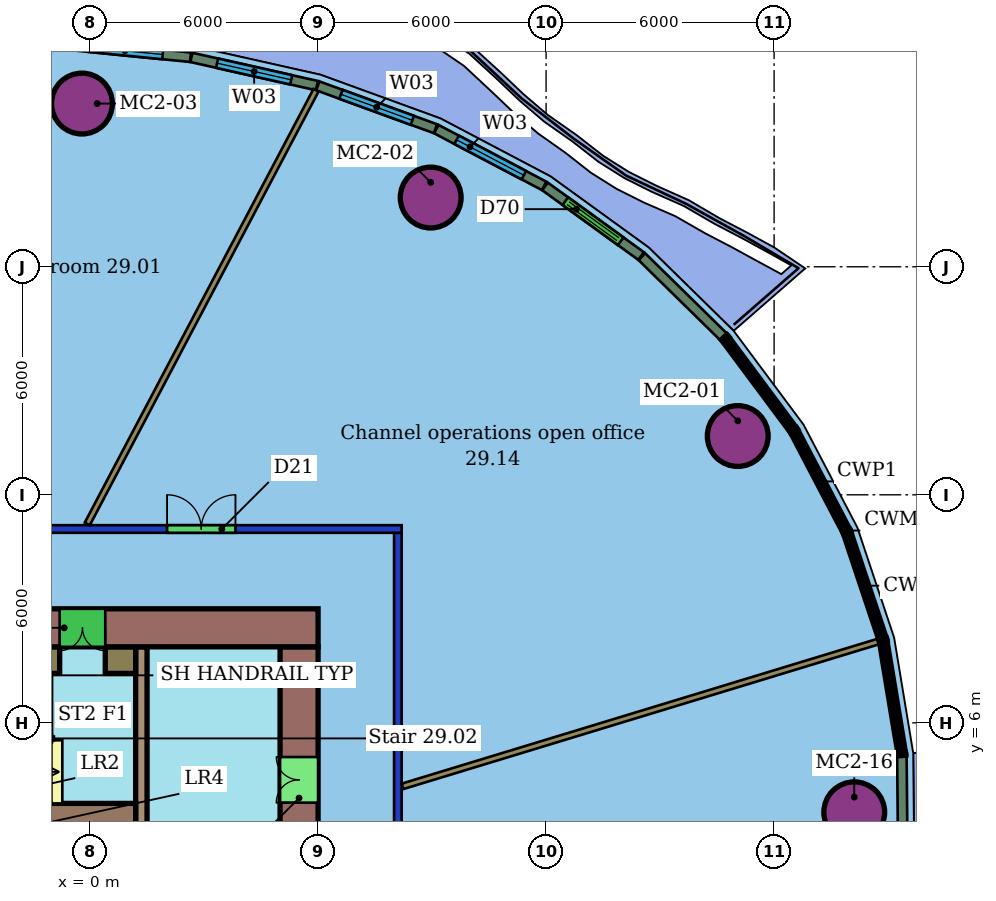
"""IFC4 building model, lengths in metres.
Left out: names, types, materials, properties, quantities, classifications, styles, units other than length and angle.
Written with IfcOpenShell. Run it as: python <this file> out.ifc"""

import sys

from ifc_helpers import new_model, si_unit, direction, frame, frame_2d, origin, origin_2d, place, context, subcontext, project, spatial, rectangle, hollow_circle, extrude, element, fill, save


model = new_model("IFC4")
c1 = context("Model", 3, precision=1e-05, world=origin(), true_north=direction((0.0, 1.0)))
c2 = subcontext(c1, "Body", "Model", "MODEL_VIEW")
j1 = project(units=[si_unit("LENGTHUNIT", "METRE"), si_unit("PLANEANGLEUNIT", "RADIAN")], contexts=[c1])
p1 = place(None, origin())
s1 = spatial("IfcSite", under=j1, at=p1, CompositionType="ELEMENT")
p2 = place(p1, origin())
s2 = spatial("IfcBuilding", under=s1, at=p2, CompositionType="ELEMENT")
p3 = place(p2, frame((0.0, 0.0, 124.6)))
s3 = spatial("IfcBuildingStorey", under=s2, at=p3, CompositionType="ELEMENT", Elevation=124.6)
for number, where, z_axis, x_axis in (
    (1, (17.043, 13.547, 0.0), (0.0, 0.0, 1.0), (1.0, 0.0, 0.0)),
    (2, (8.963, 19.821, 0.0), (0.0, 0.0, 1.0), (1.0, 0.0, 0.0)),
    (3, (-0.213, 22.294, 0.0), (0.0, 0.0, 1.0), (1.0, 0.0, 0.0)),
    (4, (20.109, 3.646, 0.0), (0.0, 0.0, 1.0), (1.0, 0.0, 0.0)),
):
    element("IfcColumn", number, at=place(p3, frame(where, z_axis=z_axis, x_axis=x_axis)), inside=s3, PredefinedType="COLUMN", context=c2, shape_type="SweptSolid", body=[
        extrude(hollow_circle(Radius=0.8, WallThickness=0.055, at=origin_2d()), origin(), (0.0, 0.0, 1.0), 3.45),
    ])
p4 = place(p3, frame((-20.2, 11.1, 0.0), z_axis=(0.0, 0.0, 1.0), x_axis=(1.0, 0.0, 0.0)))
e5 = element("IfcWall", 5, at=p4, inside=s3, PredefinedType="PARTITIONING", context=c2, shape_type="SweptSolid", body=[
    extrude(rectangle(XDim=28.4, YDim=0.2, at=frame_2d((14.2, 0.0))), origin(), (0.0, 0.0, 1.0), 3.0),
])
p5 = place(p4, frame((17.346, 0.0, 0.0)))
e6 = element("IfcOpeningElement", 6, at=p5, cuts=e5, PredefinedType="OPENING", context=c2, shape_type="SweptSolid", body=[
    extrude(rectangle(XDim=1.5, YDim=2.1, at=frame_2d((0.75, 1.05))), frame((0.0, 0.11, 0.0), z_axis=(0.0, -1.0, 0.0), x_axis=(1.0, 0.0, 0.0)), (0.0, 0.0, 1.0), 0.22),
])
p6 = place(p4, frame((10.966, 0.0, 0.0)))
e7 = element("IfcOpeningElement", 7, at=p6, cuts=e5, PredefinedType="OPENING", context=c2, shape_type="SweptSolid", body=[
    extrude(rectangle(XDim=1.0, YDim=2.1, at=frame_2d((0.5, 1.05))), frame((0.0, 0.11, 0.0), z_axis=(0.0, -1.0, 0.0), x_axis=(1.0, 0.0, 0.0)), (0.0, 0.0, 1.0), 0.22),
])
p7 = place(p4, frame((5.806, 0.0, 0.0)))
e8 = element("IfcOpeningElement", 8, at=p7, cuts=e5, PredefinedType="OPENING", context=c2, shape_type="SweptSolid", body=[
    extrude(rectangle(XDim=0.9, YDim=2.1, at=frame_2d((0.45, 1.05))), frame((0.0, 0.11, 0.0), z_axis=(0.0, -1.0, 0.0), x_axis=(1.0, 0.0, 0.0)), (0.0, 0.0, 1.0), 0.22),
])
p8 = place(p4, frame((22.226, 0.0, 0.0)))
e9 = element("IfcOpeningElement", 9, at=p8, cuts=e5, PredefinedType="OPENING", context=c2, shape_type="SweptSolid", body=[
    extrude(rectangle(XDim=1.8, YDim=2.1, at=frame_2d((0.9, 1.05))), frame((0.0, 0.11, 0.0), z_axis=(0.0, -1.0, 0.0), x_axis=(1.0, 0.0, 0.0)), (0.0, 0.0, 1.0), 0.22),
])
p9 = place(p3, frame((8.1, 11.0, 0.0), z_axis=(0.0, 0.0, 1.0), x_axis=(0.0, -1.0, 0.0)))
e10 = element("IfcWall", 10, at=p9, inside=s3, PredefinedType="PARTITIONING", context=c2, shape_type="SweptSolid", body=[
    extrude(rectangle(XDim=22.0, YDim=0.2, at=frame_2d((11.0, 0.0))), origin(), (0.0, 0.0, 1.0), 3.0),
])
p10 = place(p9, frame((18.584, 0.0, 0.0)))
e11 = element("IfcOpeningElement", 11, at=p10, cuts=e10, PredefinedType="OPENING", context=c2, shape_type="SweptSolid", body=[
    extrude(rectangle(XDim=1.0, YDim=2.1, at=frame_2d((0.5, 1.05))), frame((0.0, 0.11, 0.0), z_axis=(0.0, -1.0, 0.0), x_axis=(1.0, 0.0, 0.0)), (0.0, 0.0, 1.0), 0.22),
])
p11 = place(p9, frame((14.647, 0.0, 0.0)))
e12 = element("IfcOpeningElement", 12, at=p11, cuts=e10, PredefinedType="OPENING", context=c2, shape_type="SweptSolid", body=[
    extrude(rectangle(XDim=1.0, YDim=2.4, at=frame_2d((0.5, 1.2))), frame((0.0, 0.11, 0.0), z_axis=(0.0, -1.0, 0.0), x_axis=(1.0, 0.0, 0.0)), (0.0, 0.0, 1.0), 0.22),
])
p12 = place(p9, frame((8.033, 0.0, 0.0)))
e13 = element("IfcOpeningElement", 13, at=p12, cuts=e10, PredefinedType="OPENING", context=c2, shape_type="SweptSolid", body=[
    extrude(rectangle(XDim=0.9, YDim=2.1, at=frame_2d((0.45, 1.05))), frame((0.0, 0.11, 0.0), z_axis=(0.0, -1.0, 0.0), x_axis=(1.0, 0.0, 0.0)), (0.0, 0.0, 1.0), 0.22),
])
p13 = place(p3, frame((5.946, 22.644, 0.0), z_axis=(0.0, 0.0, 1.0), x_axis=(-0.466623744036, -0.884455924002, 0.0)))
e14 = element("IfcWall", 14, at=p13, inside=s3, PredefinedType="PARTITIONING", context=c2, shape_type="SweptSolid", body=[
    extrude(rectangle(XDim=12.9, YDim=0.15, at=frame_2d((6.45, 0.0))), origin(), (0.0, 0.0, 1.0), 3.45),
])
p14 = place(p3, frame((20.746, 8.14, 0.0), z_axis=(0.0, 0.0, 1.0), x_axis=(-0.956669363106, -0.291176458003, 0.0)))
e15 = element("IfcWall", 15, at=p14, inside=s3, PredefinedType="PARTITIONING", context=c2, shape_type="SweptSolid", body=[
    extrude(rectangle(XDim=13.091, YDim=0.15, at=frame_2d((6.545, 0.0))), origin(), (0.0, 0.0, 1.0), 3.45),
])
p15 = place(p3, frame((16.671, 16.155, 0.0), z_axis=(0.0, 0.0, 1.0), x_axis=(-0.713759845589, 0.700390521656, 0.0)))
e16 = element("IfcWall", 16, at=p15, inside=s3, PredefinedType="SOLIDWALL", context=c2, shape_type="SweptSolid", body=[
    extrude(rectangle(XDim=3.013, YDim=0.25, at=frame_2d((1.507, 0.0))), origin(), (0.0, 0.0, 1.0), 3.05),
])
p16 = place(p3, frame((14.5, 18.283, 0.0), z_axis=(0.0, 0.0, 1.0), x_axis=(-0.809860169176, 0.586622967828, 0.0)))
e17 = element("IfcWall", 17, at=p16, inside=s3, PredefinedType="SOLIDWALL", context=c2, shape_type="SweptSolid", body=[
    extrude(rectangle(XDim=3.124, YDim=0.25, at=frame_2d((1.562, 0.0))), origin(), (0.0, 0.0, 1.0), 3.05),
])
p17 = place(p16, frame((0.662, 0.0, 0.0)))
e18 = element("IfcOpeningElement", 18, at=p17, cuts=e17, PredefinedType="OPENING", context=c2, shape_type="SweptSolid", body=[
    extrude(rectangle(XDim=1.8, YDim=2.4, at=frame_2d((0.9, 1.2))), frame((0.0, 0.135, 0.0), z_axis=(0.0, -1.0, 0.0), x_axis=(1.0, 0.0, 0.0)), (0.0, 0.0, 1.0), 0.27),
])
p18 = place(p3, frame((11.948, 20.129, 0.0), z_axis=(0.0, 0.0, 1.0), x_axis=(-0.884863700739, 0.465850009245, 0.0)))
e19 = element("IfcWall", 19, at=p18, inside=s3, PredefinedType="SOLIDWALL", context=c2, shape_type="SweptSolid", body=[
    extrude(rectangle(XDim=3.206, YDim=0.25, at=frame_2d((1.603, 0.0))), origin(), (0.0, 0.0, 1.0), 3.05),
])
p19 = place(p18, frame((0.603, 0.0, 0.9)))
e20 = element("IfcOpeningElement", 20, at=p19, cuts=e19, PredefinedType="OPENING", context=c2, shape_type="SweptSolid", body=[
    extrude(rectangle(XDim=2.0, YDim=2.1, at=frame_2d((1.0, 1.05))), frame((0.0, 0.135, 0.0), z_axis=(0.0, -1.0, 0.0), x_axis=(1.0, 0.0, 0.0)), (0.0, 0.0, 1.0), 0.27),
])
p20 = place(p3, frame((9.089, 21.632, 0.0), z_axis=(0.0, 0.0, 1.0), x_axis=(-0.939579104827, 0.342331864969, 0.0)))
e21 = element("IfcWall", 21, at=p20, inside=s3, PredefinedType="SOLIDWALL", context=c2, shape_type="SweptSolid", body=[
    extrude(rectangle(XDim=3.296, YDim=0.25, at=frame_2d((1.648, 0.0))), origin(), (0.0, 0.0, 1.0), 3.05),
])
p21 = place(p20, frame((0.648, 0.0, 0.9)))
e22 = element("IfcOpeningElement", 22, at=p21, cuts=e21, PredefinedType="OPENING", context=c2, shape_type="SweptSolid", body=[
    extrude(rectangle(XDim=2.0, YDim=2.1, at=frame_2d((1.0, 1.05))), frame((0.0, 0.135, 0.0), z_axis=(0.0, -1.0, 0.0), x_axis=(1.0, 0.0, 0.0)), (0.0, 0.0, 1.0), 0.27),
])
p22 = place(p3, frame((5.969, 22.767, 0.0), z_axis=(0.0, 0.0, 1.0), x_axis=(-0.975690768568, 0.219151828949, 0.0)))
e23 = element("IfcWall", 23, at=p22, inside=s3, PredefinedType="SOLIDWALL", context=c2, shape_type="SweptSolid", body=[
    extrude(rectangle(XDim=3.385, YDim=0.25, at=frame_2d((1.693, 0.0))), origin(), (0.0, 0.0, 1.0), 3.05),
])
p23 = place(p22, frame((0.693, 0.0, 0.9)))
e24 = element("IfcOpeningElement", 24, at=p23, cuts=e23, PredefinedType="OPENING", context=c2, shape_type="SweptSolid", body=[
    extrude(rectangle(XDim=2.0, YDim=2.1, at=frame_2d((1.0, 1.05))), frame((0.0, 0.135, 0.0), z_axis=(0.0, -1.0, 0.0), x_axis=(1.0, 0.0, 0.0)), (0.0, 0.0, 1.0), 0.27),
])
p24 = place(p3, frame((2.643, 23.513, 0.0), z_axis=(0.0, 0.0, 1.0), x_axis=(-0.995116970578, 0.09870265887, 0.0)))
e25 = element("IfcWall", 25, at=p24, inside=s3, PredefinedType="SOLIDWALL", context=c2, shape_type="SweptSolid", body=[
    extrude(rectangle(XDim=3.47, YDim=0.25, at=frame_2d((1.735, 0.0))), origin(), (0.0, 0.0, 1.0), 3.05),
])
p25 = place(p24, frame((0.735, 0.0, 0.9)))
e26 = element("IfcOpeningElement", 26, at=p25, cuts=e25, PredefinedType="OPENING", context=c2, shape_type="SweptSolid", body=[
    extrude(rectangle(XDim=2.0, YDim=2.1, at=frame_2d((1.0, 1.05))), frame((0.0, 0.135, 0.0), z_axis=(0.0, -1.0, 0.0), x_axis=(1.0, 0.0, 0.0)), (0.0, 0.0, 1.0), 0.27),
])
p26 = place(p3, frame((21.391, 2.111, 0.0), z_axis=(0.0, 0.0, 1.0), x_axis=(-0.009399908842, 0.999955819881, 0.0)))
e27 = element("IfcWall", 27, at=p26, inside=s3, PredefinedType="SOLIDWALL", context=c2, shape_type="SweptSolid", body=[
    extrude(rectangle(XDim=3.013, YDim=0.25, at=frame_2d((1.506, 0.0))), origin(), (0.0, 0.0, 1.0), 3.05),
])
p27 = place(p3, frame((6.0, 8.5, 0.0), z_axis=(0.0, 0.0, 1.0), x_axis=(-1.0, 0.0, 0.0)))
e28 = element("IfcWall", 28, at=p27, inside=s3, PredefinedType="SHEAR", context=c2, shape_type="SweptSolid", body=[
    extrude(rectangle(XDim=12.0, YDim=1.0, at=frame_2d((6.0, 0.0))), origin(), (0.0, 0.0, 1.0), 3.3),
])
p28 = place(p27, frame((5.6, 0.0, 0.0)))
e29 = element("IfcOpeningElement", 29, at=p28, cuts=e28, PredefinedType="OPENING", context=c2, shape_type="SweptSolid", body=[
    extrude(rectangle(XDim=1.2, YDim=2.1, at=frame_2d((0.6, 1.05))), frame((0.0, 0.51, 0.0), z_axis=(0.0, -1.0, 0.0), x_axis=(1.0, 0.0, 0.0)), (0.0, 0.0, 1.0), 1.02),
])
p29 = place(p3, frame((5.5, -8.0, 0.0), z_axis=(0.0, 0.0, 1.0), x_axis=(0.0, 1.0, 0.0)))
e30 = element("IfcWall", 30, at=p29, inside=s3, PredefinedType="SHEAR", context=c2, shape_type="SweptSolid", body=[
    extrude(rectangle(XDim=16.0, YDim=1.0, at=frame_2d((8.0, 0.0))), origin(), (0.0, 0.0, 1.0), 3.3),
])
p30 = place(p29, frame((2.9, 0.0, 0.0)))
e31 = element("IfcOpeningElement", 31, at=p30, cuts=e30, PredefinedType="OPENING", context=c2, shape_type="SweptSolid", body=[
    extrude(rectangle(XDim=1.2, YDim=2.1, at=frame_2d((0.6, 1.05))), frame((0.0, 0.51, 0.0), z_axis=(0.0, -1.0, 0.0), x_axis=(1.0, 0.0, 0.0)), (0.0, 0.0, 1.0), 1.02),
])
p31 = place(p29, frame((11.9, 0.0, 0.0)))
e32 = element("IfcOpeningElement", 32, at=p31, cuts=e30, PredefinedType="OPENING", context=c2, shape_type="SweptSolid", body=[
    extrude(rectangle(XDim=1.2, YDim=2.1, at=frame_2d((0.6, 1.05))), frame((0.0, 0.51, 0.0), z_axis=(0.0, -1.0, 0.0), x_axis=(1.0, 0.0, 0.0)), (0.0, 0.0, 1.0), 1.02),
])
p32 = place(p3, frame((-6.0, 3.58, 0.0), z_axis=(0.0, 0.0, 1.0), x_axis=(1.0, 0.0, 0.0)))
e33 = element("IfcWall", 33, at=p32, inside=s3, PredefinedType="SHEAR", context=c2, shape_type="SweptSolid", body=[
    extrude(rectangle(XDim=7.2, YDim=0.6, at=frame_2d((3.6, 0.0))), origin(), (0.0, 0.0, 1.0), 3.3),
])
p33 = place(p3, frame((1.35, -8.0, 0.0), z_axis=(0.0, 0.0, 1.0), x_axis=(0.0, 1.0, 0.0)))
e34 = element("IfcWall", 34, at=p33, inside=s3, PredefinedType="SHEAR", context=c2, shape_type="SweptSolid", body=[
    extrude(rectangle(XDim=16.0, YDim=0.3, at=frame_2d((8.0, 0.0))), origin(), (0.0, 0.0, 1.0), 3.3),
])
p34 = place(p33, frame((1.91, 0.0, 0.0)))
e35 = element("IfcOpeningElement", 35, at=p34, cuts=e34, PredefinedType="OPENING", context=c2, shape_type="SweptSolid", body=[
    extrude(rectangle(XDim=1.0, YDim=2.1, at=frame_2d((0.5, 1.05))), frame((0.0, 0.16, 0.0), z_axis=(0.0, -1.0, 0.0), x_axis=(1.0, 0.0, 0.0)), (0.0, 0.0, 1.0), 0.32),
])
p35 = place(p33, frame((7.25, 0.0, 0.0)))
e36 = element("IfcOpeningElement", 36, at=p35, cuts=e34, PredefinedType="OPENING", context=c2, shape_type="SweptSolid", body=[
    extrude(rectangle(XDim=1.5, YDim=2.1, at=frame_2d((0.75, 1.05))), frame((0.0, 0.16, 0.0), z_axis=(0.0, -1.0, 0.0), x_axis=(1.0, 0.0, 0.0)), (0.0, 0.0, 1.0), 0.32),
])
p36 = place(p3, frame((-5.85, 7.65, 0.0), z_axis=(0.0, 0.0, 1.0), x_axis=(1.0, 0.0, 0.0)))
e37 = element("IfcWall", 37, at=p36, inside=s3, PredefinedType="SHEAR", context=c2, shape_type="SweptSolid", body=[
    extrude(rectangle(XDim=5.05, YDim=0.7, at=frame_2d((2.525, 0.0))), origin(), (0.0, 0.0, 1.0), 3.3),
])
p37 = place(p3, frame((0.4, 7.65, 0.0), z_axis=(0.0, 0.0, 1.0), x_axis=(1.0, 0.0, 0.0)))
e38 = element("IfcWall", 38, at=p37, inside=s3, PredefinedType="SHEAR", context=c2, shape_type="SweptSolid", body=[
    extrude(rectangle(XDim=0.8, YDim=0.7, at=frame_2d((0.4, 0.0))), origin(), (0.0, 0.0, 1.0), 3.3),
])
p38 = place(p8, origin())
e39 = element("IfcDoor", 39, at=p38, inside=s3, OperationType="DOUBLE_DOOR_SINGLE_SWING", PredefinedType="DOOR", context=c2, shape_type="SweptSolid", body=[
    extrude(rectangle(XDim=1.8, YDim=2.1, at=frame_2d((0.9, 1.05))), frame((0.0, 0.025, 0.0), z_axis=(0.0, -1.0, 0.0), x_axis=(1.0, 0.0, 0.0)), (0.0, 0.0, 1.0), 0.05),
])
fill(e9, e39)
p39 = place(p17, origin())
e40 = element("IfcDoor", 40, at=p39, inside=s3, OperationType="DOUBLE_DOOR_SLIDING", PredefinedType="DOOR", context=c2, shape_type="SweptSolid", body=[
    extrude(rectangle(XDim=1.8, YDim=2.4, at=frame_2d((0.9, 1.2))), frame((0.0, 0.025, 0.0), z_axis=(0.0, -1.0, 0.0), x_axis=(1.0, 0.0, 0.0)), (0.0, 0.0, 1.0), 0.05),
])
fill(e18, e40)
p40 = place(p19, origin())
e41 = element("IfcWindow", 41, at=p40, inside=s3, PartitioningType="SINGLE_PANEL", PredefinedType="WINDOW", context=c2, shape_type="SweptSolid", body=[
    extrude(rectangle(XDim=2.0, YDim=2.1, at=frame_2d((1.0, 1.05))), frame((0.0, 0.03, 0.0), z_axis=(0.0, -1.0, 0.0), x_axis=(1.0, 0.0, 0.0)), (0.0, 0.0, 1.0), 0.06),
])
fill(e20, e41)
p41 = place(p21, origin())
e42 = element("IfcWindow", 42, at=p41, inside=s3, PartitioningType="SINGLE_PANEL", PredefinedType="WINDOW", context=c2, shape_type="SweptSolid", body=[
    extrude(rectangle(XDim=2.0, YDim=2.1, at=frame_2d((1.0, 1.05))), frame((0.0, 0.03, 0.0), z_axis=(0.0, -1.0, 0.0), x_axis=(1.0, 0.0, 0.0)), (0.0, 0.0, 1.0), 0.06),
])
fill(e22, e42)
p42 = place(p23, origin())
e43 = element("IfcWindow", 43, at=p42, inside=s3, PartitioningType="SINGLE_PANEL", PredefinedType="WINDOW", context=c2, shape_type="SweptSolid", body=[
    extrude(rectangle(XDim=2.0, YDim=2.1, at=frame_2d((1.0, 1.05))), frame((0.0, 0.03, 0.0), z_axis=(0.0, -1.0, 0.0), x_axis=(1.0, 0.0, 0.0)), (0.0, 0.0, 1.0), 0.06),
])
fill(e24, e43)
p43 = place(p25, origin())
e44 = element("IfcWindow", 44, at=p43, inside=s3, PartitioningType="SINGLE_PANEL", PredefinedType="WINDOW", context=c2, shape_type="SweptSolid", body=[
    extrude(rectangle(XDim=2.0, YDim=2.1, at=frame_2d((1.0, 1.05))), frame((0.0, 0.03, 0.0), z_axis=(0.0, -1.0, 0.0), x_axis=(1.0, 0.0, 0.0)), (0.0, 0.0, 1.0), 0.06),
])
fill(e26, e44)
p44 = place(p28, origin())
e45 = element("IfcDoor", 45, at=p44, inside=s3, OperationType="DOUBLE_DOOR_SINGLE_SWING", PredefinedType="NOTDEFINED", context=c2, shape_type="SweptSolid", body=[
    extrude(rectangle(XDim=1.2, YDim=2.1, at=frame_2d((0.6, 1.05))), frame((0.0, 0.025, 0.0), z_axis=(0.0, -1.0, 0.0), x_axis=(1.0, 0.0, 0.0)), (0.0, 0.0, 1.0), 0.05),
])
fill(e29, e45)
p45 = place(p31, origin())
e46 = element("IfcDoor", 46, at=p45, inside=s3, OperationType="DOUBLE_DOOR_SINGLE_SWING", PredefinedType="NOTDEFINED", context=c2, shape_type="SweptSolid", body=[
    extrude(rectangle(XDim=1.2, YDim=2.1, at=frame_2d((0.6, 1.05))), frame((0.0, 0.025, 0.0), z_axis=(0.0, -1.0, 0.0), x_axis=(1.0, 0.0, 0.0)), (0.0, 0.0, 1.0), 0.05),
])
fill(e32, e46)
save(model, sys.argv[1])
